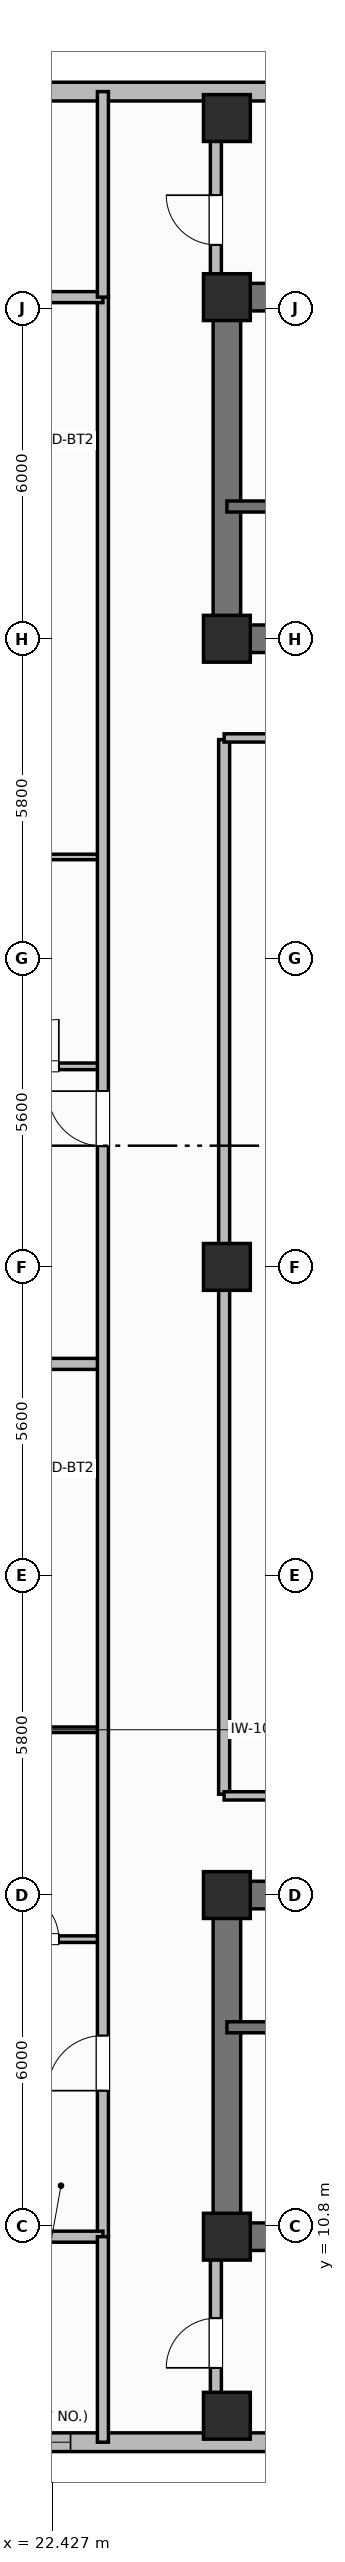
"""IFC4 building model, lengths in metres.
Left out: names, types, materials, properties, quantities, classifications, styles, units other than length and angle.
Written with IfcOpenShell. Run it as: python <this file> out.ifc"""

import sys

from ifc_helpers import new_model, si_unit, direction, frame, frame_2d, origin, origin_2d, place, context, subcontext, project, spatial, rectangle, extrude, element, fill, save


model = new_model("IFC4")
c1 = context("Model", 3, precision=1e-05, world=origin(), true_north=direction((0.0, 1.0)))
c2 = subcontext(c1, "Body", "Model", "MODEL_VIEW")
j1 = project(units=[si_unit("LENGTHUNIT", "METRE"), si_unit("PLANEANGLEUNIT", "RADIAN")], contexts=[c1])
p1 = place(None, origin())
s1 = spatial("IfcSite", under=j1, at=p1, CompositionType="ELEMENT")
p2 = place(p1, origin())
s2 = spatial("IfcBuilding", under=s1, at=p2, CompositionType="ELEMENT")
p3 = place(p2, frame((0.0, 0.0, 207.3)))
s3 = spatial("IfcBuildingStorey", under=s2, at=p3, CompositionType="ELEMENT", Elevation=207.3)
p4 = place(p3, frame((52.8, 10.6, 0.0), z_axis=(0.0, 0.0, 1.0), x_axis=(-1.0, 0.0, 0.0)))
e1 = element("IfcWall", 1, at=p4, inside=s3, PredefinedType="SHEAR", context=c2, shape_type="SweptSolid", body=[
    extrude(rectangle(XDim=27.2, YDim=0.5, at=frame_2d((13.6, 0.0))), origin(), (0.0, 0.0, 1.0), 3.7),
])
p5 = place(p3, frame((25.6, 10.85, 0.0), z_axis=(0.0, 0.0, 1.0), x_axis=(0.0, 1.0, 0.0)))
e2 = element("IfcWall", 2, at=p5, inside=s3, PredefinedType="SHEAR", context=c2, shape_type="SweptSolid", body=[
    extrude(rectangle(XDim=5.7, YDim=0.5, at=frame_2d((2.85, 0.0))), origin(), (0.0, 0.0, 1.0), 3.7),
])
p6 = place(p3, frame((25.6, 16.8, 0.0), z_axis=(0.0, 0.0, 1.0), x_axis=(1.0, 0.0, 0.0)))
e3 = element("IfcWall", 3, at=p6, inside=s3, PredefinedType="SHEAR", context=c2, shape_type="SweptSolid", body=[
    extrude(rectangle(XDim=27.2, YDim=0.5, at=frame_2d((13.6, 0.0))), origin(), (0.0, 0.0, 1.0), 3.7),
])
p7 = place(p6, frame((1.9, 0.0, 0.0)))
e4 = element("IfcOpeningElement", 4, at=p7, cuts=e3, PredefinedType="OPENING", context=c2, shape_type="SweptSolid", body=[
    extrude(rectangle(XDim=1.1, YDim=2.15, at=frame_2d((0.55, 1.075))), frame((0.0, 0.26, 0.0), z_axis=(0.0, -1.0, 0.0), x_axis=(1.0, 0.0, 0.0)), (0.0, 0.0, 1.0), 0.52),
])
p8 = place(p6, frame((13.0, 0.0, 0.0)))
e5 = element("IfcOpeningElement", 5, at=p8, cuts=e3, PredefinedType="OPENING", context=c2, shape_type="SweptSolid", body=[
    extrude(rectangle(XDim=1.2, YDim=2.15, at=frame_2d((0.6, 1.075))), frame((0.0, 0.26, 0.0), z_axis=(0.0, -1.0, 0.0), x_axis=(1.0, 0.0, 0.0)), (0.0, 0.0, 1.0), 0.52),
])
p9 = place(p6, frame((21.6, 0.0, 0.0)))
e6 = element("IfcOpeningElement", 6, at=p9, cuts=e3, PredefinedType="OPENING", context=c2, shape_type="SweptSolid", body=[
    extrude(rectangle(XDim=1.0, YDim=2.15, at=frame_2d((0.5, 1.075))), frame((0.0, 0.26, 0.0), z_axis=(0.0, -1.0, 0.0), x_axis=(1.0, 0.0, 0.0)), (0.0, 0.0, 1.0), 0.52),
])
p10 = place(p3, frame((25.6, 45.8, 0.0), z_axis=(0.0, 0.0, 1.0), x_axis=(1.0, 0.0, 0.0)))
e7 = element("IfcWall", 7, at=p10, inside=s3, PredefinedType="SHEAR", context=c2, shape_type="SweptSolid", body=[
    extrude(rectangle(XDim=27.2, YDim=0.5, at=frame_2d((13.6, 0.0))), origin(), (0.0, 0.0, 1.0), 3.7),
])
p11 = place(p3, frame((25.6, 39.85, 0.0), z_axis=(0.0, 0.0, 1.0), x_axis=(0.0, 1.0, 0.0)))
e8 = element("IfcWall", 8, at=p11, inside=s3, PredefinedType="SHEAR", context=c2, shape_type="SweptSolid", body=[
    extrude(rectangle(XDim=5.7, YDim=0.5, at=frame_2d((2.85, 0.0))), origin(), (0.0, 0.0, 1.0), 3.7),
])
p12 = place(p3, frame((52.8, 39.6, 0.0), z_axis=(0.0, 0.0, 1.0), x_axis=(-1.0, 0.0, 0.0)))
e9 = element("IfcWall", 9, at=p12, inside=s3, PredefinedType="SHEAR", context=c2, shape_type="SweptSolid", body=[
    extrude(rectangle(XDim=27.2, YDim=0.5, at=frame_2d((13.6, 0.0))), origin(), (0.0, 0.0, 1.0), 3.7),
])
p13 = place(p12, frame((24.2, 0.0, 0.0)))
e10 = element("IfcOpeningElement", 10, at=p13, cuts=e9, PredefinedType="OPENING", context=c2, shape_type="SweptSolid", body=[
    extrude(rectangle(XDim=1.1, YDim=2.15, at=frame_2d((0.55, 1.075))), frame((0.0, 0.26, 0.0), z_axis=(0.0, -1.0, 0.0), x_axis=(1.0, 0.0, 0.0)), (0.0, 0.0, 1.0), 0.52),
])
p14 = place(p12, frame((15.1, 0.0, 0.0)))
e11 = element("IfcOpeningElement", 11, at=p14, cuts=e9, PredefinedType="OPENING", context=c2, shape_type="SweptSolid", body=[
    extrude(rectangle(XDim=1.2, YDim=2.15, at=frame_2d((0.6, 1.075))), frame((0.0, 0.26, 0.0), z_axis=(0.0, -1.0, 0.0), x_axis=(1.0, 0.0, 0.0)), (0.0, 0.0, 1.0), 0.52),
])
p15 = place(p12, frame((11.6, 0.0, 0.0)))
e12 = element("IfcOpeningElement", 12, at=p15, cuts=e9, PredefinedType="OPENING", context=c2, shape_type="SweptSolid", body=[
    extrude(rectangle(XDim=0.9, YDim=2.1, at=frame_2d((0.45, 1.05))), frame((0.0, 0.26, 0.0), z_axis=(0.0, -1.0, 0.0), x_axis=(1.0, 0.0, 0.0)), (0.0, 0.0, 1.0), 0.52),
])
p16 = place(p12, frame((7.35, 0.0, 0.0)))
e13 = element("IfcOpeningElement", 13, at=p16, cuts=e9, PredefinedType="OPENING", context=c2, shape_type="SweptSolid", body=[
    extrude(rectangle(XDim=0.85, YDim=2.1, at=frame_2d((0.425, 1.05))), frame((0.0, 0.26, 0.0), z_axis=(0.0, -1.0, 0.0), x_axis=(1.0, 0.0, 0.0)), (0.0, 0.0, 1.0), 0.52),
])
p17 = place(p12, frame((4.2, 0.0, 0.0)))
e14 = element("IfcOpeningElement", 14, at=p17, cuts=e9, PredefinedType="OPENING", context=c2, shape_type="SweptSolid", body=[
    extrude(rectangle(XDim=1.3, YDim=2.2, at=frame_2d((0.65, 1.1))), frame((0.0, 0.26, 0.0), z_axis=(0.0, -1.0, 0.0), x_axis=(1.0, 0.0, 0.0)), (0.0, 0.0, 1.0), 0.52),
])
for number, where, z_axis, x_axis in (
    (15, (25.6, 10.6, 0.0), (0.0, 0.0, 1.0), (1.0, 0.0, 0.0)),
    (16, (25.6, 16.8, 0.0), (0.0, 0.0, 1.0), (1.0, 0.0, 0.0)),
    (17, (25.6, 39.6, 0.0), (0.0, 0.0, 1.0), (1.0, 0.0, 0.0)),
    (18, (25.6, 45.8, 0.0), (0.0, 0.0, 1.0), (1.0, 0.0, 0.0)),
    (19, (25.6, 28.2, 0.0), (0.0, 0.0, 1.0), (1.0, 0.0, 0.0)),
    (20, (25.6, 7.35, 0.0), (0.0, 0.0, 1.0), (1.0, 0.0, 0.0)),
    (21, (25.6, 49.05, 0.0), (0.0, 0.0, 1.0), (1.0, 0.0, 0.0)),
):
    element("IfcColumn", number, at=place(p3, frame(where, z_axis=z_axis, x_axis=x_axis)), inside=s3, PredefinedType="COLUMN", context=c2, shape_type="SweptSolid", body=[
        extrude(rectangle(XDim=0.85, YDim=0.85, at=origin_2d()), origin(), (0.0, 0.0, 1.0), 3.7),
    ])
p18 = place(p3, frame((20.2, 6.87, 0.0), z_axis=(0.0, 0.0, 1.0), x_axis=(1.0, 0.0, 0.0)))
e22 = element("IfcWall", 22, at=p18, inside=s3, PredefinedType="SOLIDWALL", context=c2, shape_type="SweptSolid", body=[
    extrude(rectangle(XDim=15.8, YDim=0.34, at=frame_2d((7.9, 0.0))), origin(), (0.0, 0.0, 1.0), 2.72),
])
p19 = place(p18, frame((0.962, 0.0, 0.7)))
e23 = element("IfcOpeningElement", 23, at=p19, cuts=e22, PredefinedType="OPENING", context=c2, shape_type="SweptSolid", body=[
    extrude(rectangle(XDim=1.6, YDim=1.9, at=frame_2d((0.8, 0.95))), frame((0.0, 0.18, 0.0), z_axis=(0.0, -1.0, 0.0), x_axis=(1.0, 0.0, 0.0)), (0.0, 0.0, 1.0), 0.36),
])
p20 = place(p18, frame((8.562, 0.0, 0.7)))
e24 = element("IfcOpeningElement", 24, at=p20, cuts=e22, PredefinedType="OPENING", context=c2, shape_type="SweptSolid", body=[
    extrude(rectangle(XDim=1.6, YDim=1.9, at=frame_2d((0.8, 0.95))), frame((0.0, 0.18, 0.0), z_axis=(0.0, -1.0, 0.0), x_axis=(1.0, 0.0, 0.0)), (0.0, 0.0, 1.0), 0.36),
])
p21 = place(p18, frame((11.837, 0.0, 0.7)))
e25 = element("IfcOpeningElement", 25, at=p21, cuts=e22, PredefinedType="OPENING", context=c2, shape_type="SweptSolid", body=[
    extrude(rectangle(XDim=1.6, YDim=1.9, at=frame_2d((0.8, 0.95))), frame((0.0, 0.18, 0.0), z_axis=(0.0, -1.0, 0.0), x_axis=(1.0, 0.0, 0.0)), (0.0, 0.0, 1.0), 0.36),
])
p22 = place(p3, frame((36.0, 49.53, 0.0), z_axis=(0.0, 0.0, 1.0), x_axis=(-1.0, 0.0, 0.0)))
e26 = element("IfcWall", 26, at=p22, inside=s3, PredefinedType="SOLIDWALL", context=c2, shape_type="SweptSolid", body=[
    extrude(rectangle(XDim=15.8, YDim=0.34, at=frame_2d((7.9, 0.0))), origin(), (0.0, 0.0, 1.0), 2.72),
])
p23 = place(p22, frame((6.85, 0.0, 0.7)))
e27 = element("IfcOpeningElement", 27, at=p23, cuts=e26, PredefinedType="OPENING", context=c2, shape_type="SweptSolid", body=[
    extrude(rectangle(XDim=2.1, YDim=1.9, at=frame_2d((1.05, 0.95))), frame((0.0, 0.18, 0.0), z_axis=(0.0, -1.0, 0.0), x_axis=(1.0, 0.0, 0.0)), (0.0, 0.0, 1.0), 0.36),
])
p24 = place(p3, frame((25.6, 14.4, 0.0), z_axis=(0.0, 0.0, 1.0), x_axis=(1.0, 0.0, 0.0)))
e28 = element("IfcWall", 28, at=p24, inside=s3, PredefinedType="SHEAR", context=c2, shape_type="SweptSolid", body=[
    extrude(rectangle(XDim=9.55, YDim=0.2, at=frame_2d((4.775, 0.0))), origin(), (0.0, 0.0, 1.0), 3.7),
])
p25 = place(p24, frame((1.05, 0.0, 0.0)))
e29 = element("IfcOpeningElement", 29, at=p25, cuts=e28, PredefinedType="OPENING", context=c2, shape_type="SweptSolid", body=[
    extrude(rectangle(XDim=1.1, YDim=2.15, at=frame_2d((0.55, 1.075))), frame((0.0, 0.11, 0.0), z_axis=(0.0, -1.0, 0.0), x_axis=(1.0, 0.0, 0.0)), (0.0, 0.0, 1.0), 0.22),
])
p26 = place(p3, frame((35.15, 42.0, 0.0), z_axis=(0.0, 0.0, 1.0), x_axis=(-1.0, 0.0, 0.0)))
e30 = element("IfcWall", 30, at=p26, inside=s3, PredefinedType="SHEAR", context=c2, shape_type="SweptSolid", body=[
    extrude(rectangle(XDim=9.55, YDim=0.2, at=frame_2d((4.775, 0.0))), origin(), (0.0, 0.0, 1.0), 3.7),
])
p27 = place(p26, frame((7.25, 0.0, 0.0)))
e31 = element("IfcOpeningElement", 31, at=p27, cuts=e30, PredefinedType="OPENING", context=c2, shape_type="SweptSolid", body=[
    extrude(rectangle(XDim=1.1, YDim=2.15, at=frame_2d((0.55, 1.075))), frame((0.0, 0.11, 0.0), z_axis=(0.0, -1.0, 0.0), x_axis=(1.0, 0.0, 0.0)), (0.0, 0.0, 1.0), 0.22),
])
p28 = place(p3, frame((25.55, 18.63, 0.0), z_axis=(0.0, 0.0, 1.0), x_axis=(0.0, 1.0, 0.0)))
e32 = element("IfcWall", 32, at=p28, inside=s3, PredefinedType="PARTITIONING", context=c2, shape_type="SweptSolid", body=[
    extrude(rectangle(XDim=19.14, YDim=0.2, at=frame_2d((9.57, 0.0))), origin(), (0.0, 0.0, 1.0), 2.55),
])
for number, where, z_axis, x_axis in (
    (33, (25.55, 18.6, 0.0), (0.0, 0.0, 1.0), (1.0, 0.0, 0.0)),
    (34, (25.55, 37.8, 0.0), (0.0, 0.0, 1.0), (1.0, 0.0, 0.0)),
):
    element("IfcWall", number, at=place(p3, frame(where, z_axis=z_axis, x_axis=x_axis)), inside=s3, PredefinedType="PARTITIONING", context=c2, shape_type="SweptSolid", body=[
        extrude(rectangle(XDim=22.2, YDim=0.15, at=frame_2d((11.1, 0.0))), origin(), (0.0, 0.0, 1.0), 2.55),
    ])
p29 = place(p3, frame((21.1, 16.0, 0.0), z_axis=(0.0, 0.0, 1.0), x_axis=(1.0, 0.0, 0.0)))
e35 = element("IfcWall", 35, at=p29, inside=s3, PredefinedType="PARTITIONING", context=c2, shape_type="SweptSolid", body=[
    extrude(rectangle(XDim=2.25, YDim=0.12, at=frame_2d((1.125, 0.0))), origin(), (0.0, 0.0, 1.0), 2.55),
])
p30 = place(p29, frame((0.6, 0.0, 0.0)))
e36 = element("IfcOpeningElement", 36, at=p30, cuts=e35, PredefinedType="OPENING", context=c2, shape_type="SweptSolid", body=[
    extrude(rectangle(XDim=0.85, YDim=2.1, at=frame_2d((0.425, 1.05))), frame((0.0, 0.07, 0.0), z_axis=(0.0, -1.0, 0.0), x_axis=(1.0, 0.0, 0.0)), (0.0, 0.0, 1.0), 0.14),
])
p31 = place(p3, frame((21.1, 19.8, 0.0), z_axis=(0.0, 0.0, 1.0), x_axis=(1.0, 0.0, 0.0)))
e37 = element("IfcWall", 37, at=p31, inside=s3, PredefinedType="PARTITIONING", context=c2, shape_type="SweptSolid", body=[
    extrude(rectangle(XDim=2.25, YDim=0.1, at=frame_2d((1.125, 0.0))), origin(), (0.0, 0.0, 1.0), 2.55),
])
p32 = place(p3, frame((17.016, 26.44, 0.0), z_axis=(0.0, 0.0, 1.0), x_axis=(1.0, 0.0, 0.0)))
e38 = element("IfcWall", 38, at=p32, inside=s3, PredefinedType="PARTITIONING", context=c2, shape_type="SweptSolid", body=[
    extrude(rectangle(XDim=6.334, YDim=0.2, at=frame_2d((3.167, 0.0))), origin(), (0.0, 0.0, 1.0), 2.55),
])
p33 = place(p3, frame((21.1, 31.84, 0.0), z_axis=(0.0, 0.0, 1.0), x_axis=(1.0, 0.0, 0.0)))
e39 = element("IfcWall", 39, at=p33, inside=s3, PredefinedType="PARTITIONING", context=c2, shape_type="SweptSolid", body=[
    extrude(rectangle(XDim=2.25, YDim=0.12, at=frame_2d((1.125, 0.0))), origin(), (0.0, 0.0, 1.0), 2.55),
])
p34 = place(p33, frame((0.6, 0.0, 0.0)))
e40 = element("IfcOpeningElement", 40, at=p34, cuts=e39, PredefinedType="OPENING", context=c2, shape_type="SweptSolid", body=[
    extrude(rectangle(XDim=0.85, YDim=2.1, at=frame_2d((0.425, 1.05))), frame((0.0, 0.07, 0.0), z_axis=(0.0, -1.0, 0.0), x_axis=(1.0, 0.0, 0.0)), (0.0, 0.0, 1.0), 0.14),
])
p35 = place(p3, frame((21.1, 35.64, 0.0), z_axis=(0.0, 0.0, 1.0), x_axis=(1.0, 0.0, 0.0)))
e41 = element("IfcWall", 41, at=p35, inside=s3, PredefinedType="PARTITIONING", context=c2, shape_type="SweptSolid", body=[
    extrude(rectangle(XDim=2.25, YDim=0.1, at=frame_2d((1.125, 0.0))), origin(), (0.0, 0.0, 1.0), 2.55),
])
p36 = place(p3, frame((23.35, 10.6, 0.0), z_axis=(0.0, 0.0, 1.0), x_axis=(0.0, 1.0, 0.0)))
e42 = element("IfcWall", 42, at=p36, inside=s3, PredefinedType="PARTITIONING", context=c2, shape_type="SweptSolid", body=[
    extrude(rectangle(XDim=35.2, YDim=0.2, at=frame_2d((17.6, 0.0))), origin(), (0.0, 0.0, 1.0), 2.55),
])
p37 = place(p36, frame((2.65, 0.0, 0.0)))
e43 = element("IfcOpeningElement", 43, at=p37, cuts=e42, PredefinedType="OPENING", context=c2, shape_type="SweptSolid", body=[
    extrude(rectangle(XDim=1.0, YDim=2.15, at=frame_2d((0.5, 1.075))), frame((0.0, 0.11, 0.0), z_axis=(0.0, -1.0, 0.0), x_axis=(1.0, 0.0, 0.0)), (0.0, 0.0, 1.0), 0.22),
])
p38 = place(p36, frame((19.79, 0.0, 0.0)))
e44 = element("IfcOpeningElement", 44, at=p38, cuts=e42, PredefinedType="OPENING", context=c2, shape_type="SweptSolid", body=[
    extrude(rectangle(XDim=1.0, YDim=2.15, at=frame_2d((0.5, 1.075))), frame((0.0, 0.11, 0.0), z_axis=(0.0, -1.0, 0.0), x_axis=(1.0, 0.0, 0.0)), (0.0, 0.0, 1.0), 0.22),
])
for number, where, z_axis, x_axis in (
    (45, (16.99, 10.6, 0.0), (0.0, 0.0, 1.0), (1.0, 0.0, 0.0)),
    (46, (16.99, 45.8, 0.0), (0.0, 0.0, 1.0), (1.0, 0.0, 0.0)),
):
    element("IfcWall", number, at=place(p3, frame(where, z_axis=z_axis, x_axis=x_axis)), inside=s3, PredefinedType="PARTITIONING", context=c2, shape_type="SweptSolid", body=[
        extrude(rectangle(XDim=6.36, YDim=0.2, at=frame_2d((3.18, 0.0))), origin(), (0.0, 0.0, 1.0), 2.55),
    ])
for number, where, z_axis, x_axis in (
    (47, (23.35, 6.87, 0.0), (0.0, 0.0, 1.0), (0.0, 1.0, 0.0)),
    (48, (23.35, 45.8, 0.0), (0.0, 0.0, 1.0), (0.0, 1.0, 0.0)),
):
    element("IfcWall", number, at=place(p3, frame(where, z_axis=z_axis, x_axis=x_axis)), inside=s3, PredefinedType="PARTITIONING", context=c2, shape_type="SweptSolid", body=[
        extrude(rectangle(XDim=3.73, YDim=0.2, at=frame_2d((1.865, 0.0))), origin(), (0.0, 0.0, 1.0), 2.55),
    ])
p39 = place(p3, frame((25.4, 7.57, 0.0), z_axis=(0.0, 0.0, 1.0), x_axis=(0.0, 1.0, 0.0)))
e49 = element("IfcWall", 49, at=p39, inside=s3, PredefinedType="PARTITIONING", context=c2, shape_type="SweptSolid", body=[
    extrude(rectangle(XDim=2.73, YDim=0.2, at=frame_2d((1.365, 0.0))), origin(), (0.0, 0.0, 1.0), 2.55),
])
p40 = place(p39, frame((0.65, 0.0, 0.0)))
e50 = element("IfcOpeningElement", 50, at=p40, cuts=e49, PredefinedType="OPENING", context=c2, shape_type="SweptSolid", body=[
    extrude(rectangle(XDim=0.9, YDim=2.1, at=frame_2d((0.45, 1.05))), frame((0.0, 0.11, 0.0), z_axis=(0.0, -1.0, 0.0), x_axis=(1.0, 0.0, 0.0)), (0.0, 0.0, 1.0), 0.22),
])
p41 = place(p3, frame((25.4, 46.1, 0.0), z_axis=(0.0, 0.0, 1.0), x_axis=(0.0, 1.0, 0.0)))
e51 = element("IfcWall", 51, at=p41, inside=s3, PredefinedType="PARTITIONING", context=c2, shape_type="SweptSolid", body=[
    extrude(rectangle(XDim=2.73, YDim=0.2, at=frame_2d((1.365, 0.0))), origin(), (0.0, 0.0, 1.0), 2.55),
])
p42 = place(p41, frame((0.65, 0.0, 0.0)))
e52 = element("IfcOpeningElement", 52, at=p42, cuts=e51, PredefinedType="OPENING", context=c2, shape_type="SweptSolid", body=[
    extrude(rectangle(XDim=0.9, YDim=2.1, at=frame_2d((0.45, 1.05))), frame((0.0, 0.11, 0.0), z_axis=(0.0, -1.0, 0.0), x_axis=(1.0, 0.0, 0.0)), (0.0, 0.0, 1.0), 0.22),
])
p43 = place(p19, origin())
e53 = element("IfcWindow", 53, at=p43, inside=s3, PartitioningType="SINGLE_PANEL", PredefinedType="WINDOW", context=c2, shape_type="SweptSolid", body=[
    extrude(rectangle(XDim=1.6, YDim=1.9, at=frame_2d((0.8, 0.95))), frame((0.0, 0.03, 0.0), z_axis=(0.0, -1.0, 0.0), x_axis=(1.0, 0.0, 0.0)), (0.0, 0.0, 1.0), 0.06),
])
fill(e23, e53)
p44 = place(p30, origin())
e54 = element("IfcDoor", 54, at=p44, inside=s3, OperationType="SINGLE_SWING_LEFT", PredefinedType="DOOR", context=c2, shape_type="SweptSolid", body=[
    extrude(rectangle(XDim=0.85, YDim=2.1, at=frame_2d((0.425, 1.05))), frame((0.0, 0.025, 0.0), z_axis=(0.0, -1.0, 0.0), x_axis=(1.0, 0.0, 0.0)), (0.0, 0.0, 1.0), 0.05),
])
fill(e36, e54)
p45 = place(p34, origin())
e55 = element("IfcDoor", 55, at=p45, inside=s3, OperationType="SINGLE_SWING_RIGHT", PredefinedType="DOOR", context=c2, shape_type="SweptSolid", body=[
    extrude(rectangle(XDim=0.85, YDim=2.1, at=frame_2d((0.425, 1.05))), frame((0.0, 0.025, 0.0), z_axis=(0.0, -1.0, 0.0), x_axis=(1.0, 0.0, 0.0)), (0.0, 0.0, 1.0), 0.05),
])
fill(e40, e55)
p46 = place(p37, origin())
e56 = element("IfcDoor", 56, at=p46, inside=s3, OperationType="SINGLE_SWING_LEFT", PredefinedType="DOOR", context=c2, shape_type="SweptSolid", body=[
    extrude(rectangle(XDim=1.0, YDim=2.15, at=frame_2d((0.5, 1.075))), frame((0.0, 0.025, 0.0), z_axis=(0.0, -1.0, 0.0), x_axis=(1.0, 0.0, 0.0)), (0.0, 0.0, 1.0), 0.05),
])
fill(e43, e56)
p47 = place(p38, origin())
e57 = element("IfcDoor", 57, at=p47, inside=s3, OperationType="SINGLE_SWING_RIGHT", PredefinedType="DOOR", context=c2, shape_type="SweptSolid", body=[
    extrude(rectangle(XDim=1.0, YDim=2.15, at=frame_2d((0.5, 1.075))), frame((0.0, 0.025, 0.0), z_axis=(0.0, -1.0, 0.0), x_axis=(1.0, 0.0, 0.0)), (0.0, 0.0, 1.0), 0.05),
])
fill(e44, e57)
p48 = place(p40, origin())
e58 = element("IfcDoor", 58, at=p48, inside=s3, OperationType="SINGLE_SWING_LEFT", PredefinedType="DOOR", context=c2, shape_type="SweptSolid", body=[
    extrude(rectangle(XDim=0.9, YDim=2.1, at=frame_2d((0.45, 1.05))), frame((0.0, 0.025, 0.0), z_axis=(0.0, -1.0, 0.0), x_axis=(1.0, 0.0, 0.0)), (0.0, 0.0, 1.0), 0.05),
])
fill(e50, e58)
p49 = place(p42, origin())
e59 = element("IfcDoor", 59, at=p49, inside=s3, OperationType="SINGLE_SWING_RIGHT", PredefinedType="DOOR", context=c2, shape_type="SweptSolid", body=[
    extrude(rectangle(XDim=0.9, YDim=2.1, at=frame_2d((0.45, 1.05))), frame((0.0, 0.025, 0.0), z_axis=(0.0, -1.0, 0.0), x_axis=(1.0, 0.0, 0.0)), (0.0, 0.0, 1.0), 0.05),
])
fill(e52, e59)
save(model, sys.argv[1])
